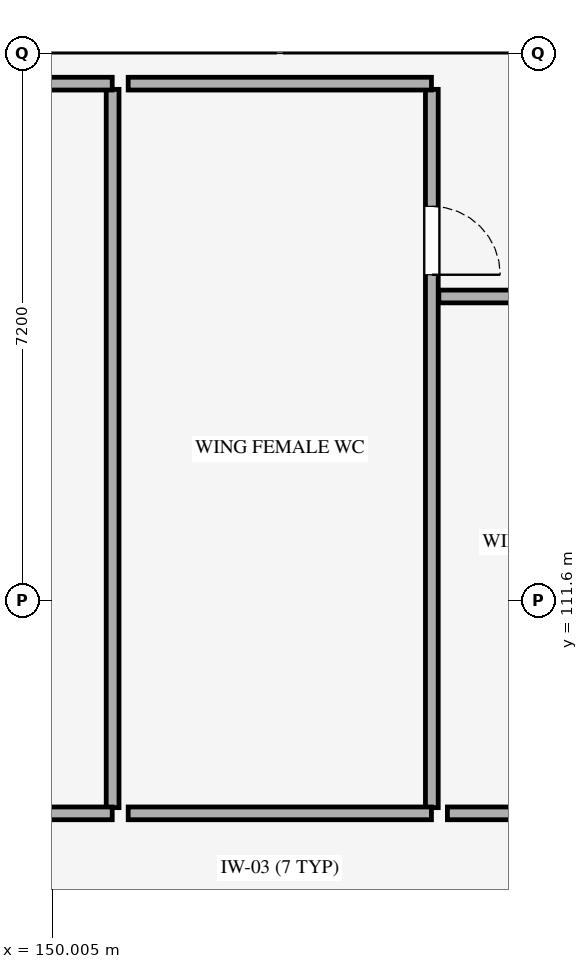
"""IFC4 building model, lengths in metres.
Left out: names, types, materials, properties, quantities, classifications, styles, units other than length and angle.
Written with IfcOpenShell. Run it as: python <this file> out.ifc"""

import sys

from ifc_helpers import new_model, si_unit, direction, frame, frame_2d, origin, place, context, subcontext, project, spatial, rectangle, extrude, element, fill, save


model = new_model("IFC4")
c1 = context("Model", 3, precision=1e-05, world=origin(), true_north=direction((0.0, 1.0)))
c2 = subcontext(c1, "Body", "Model", "MODEL_VIEW")
j1 = project(units=[si_unit("LENGTHUNIT", "METRE"), si_unit("PLANEANGLEUNIT", "RADIAN")], contexts=[c1])
p1 = place(None, origin())
s1 = spatial("IfcSite", under=j1, at=p1, CompositionType="ELEMENT")
p2 = place(p1, origin())
s2 = spatial("IfcBuilding", under=s1, at=p2, CompositionType="ELEMENT")
p3 = place(p2, origin())
s3 = spatial("IfcBuildingStorey", under=s2, at=p3, CompositionType="ELEMENT", Elevation=0.0)
p4 = place(p3, frame((150.8, 118.325, 0.0), z_axis=(0.0, 0.0, 1.0), x_axis=(0.0, -1.0, 0.0)))
e1 = element("IfcWall", 1, at=p4, inside=s3, PredefinedType="STANDARD", context=c2, shape_type="SweptSolid", body=[
    extrude(rectangle(XDim=9.45, YDim=0.168, at=frame_2d((4.725, 0.0))), origin(), (0.0, 0.0, 1.0), 3.27),
])
p5 = place(p3, frame((150.795, 108.8, 0.0), z_axis=(0.0, 0.0, 1.0), x_axis=(-1.0, 0.0, 0.0)))
e2 = element("IfcWall", 2, at=p5, inside=s3, PredefinedType="STANDARD", context=c2, shape_type="SweptSolid", body=[
    extrude(rectangle(XDim=4.19, YDim=0.168, at=frame_2d((2.095, 0.0))), origin(), (0.0, 0.0, 1.0), 4.07),
])
p6 = place(p5, frame((1.645, 0.0, 0.0)))
e3 = element("IfcOpeningElement", 3, at=p6, cuts=e2, PredefinedType="OPENING", context=c2, shape_type="SweptSolid", body=[
    extrude(rectangle(XDim=0.9, YDim=2.1, at=frame_2d((0.45, 1.05))), frame((0.0, 0.094, 0.0), z_axis=(0.0, -1.0, 0.0), x_axis=(1.0, 0.0, 0.0)), (0.0, 0.0, 1.0), 0.188),
])
p7 = place(p3, frame((146.605, 118.4, 0.0), z_axis=(0.0, 0.0, 1.0), x_axis=(1.0, 0.0, 0.0)))
e4 = element("IfcWall", 4, at=p7, inside=s3, PredefinedType="STANDARD", context=c2, shape_type="SweptSolid", body=[
    extrude(rectangle(XDim=4.19, YDim=0.168, at=frame_2d((2.095, 0.0))), origin(), (0.0, 0.0, 1.0), 3.67),
])
p8 = place(p3, frame((155.0, 118.325, 0.0), z_axis=(0.0, 0.0, 1.0), x_axis=(0.0, -1.0, 0.0)))
e5 = element("IfcWall", 5, at=p8, inside=s3, PredefinedType="STANDARD", context=c2, shape_type="SweptSolid", body=[
    extrude(rectangle(XDim=9.45, YDim=0.168, at=frame_2d((4.725, 0.0))), origin(), (0.0, 0.0, 1.0), 3.27),
])
p9 = place(p8, frame((1.539, 0.0, 0.0)))
e6 = element("IfcOpeningElement", 6, at=p9, cuts=e5, PredefinedType="OPENING", context=c2, shape_type="SweptSolid", body=[
    extrude(rectangle(XDim=0.9, YDim=2.1, at=frame_2d((0.45, 1.05))), frame((0.0, 0.094, 0.0), z_axis=(0.0, -1.0, 0.0), x_axis=(1.0, 0.0, 0.0)), (0.0, 0.0, 1.0), 0.188),
])
p10 = place(p3, frame((154.995, 108.8, 0.0), z_axis=(0.0, 0.0, 1.0), x_axis=(-1.0, 0.0, 0.0)))
e7 = element("IfcWall", 7, at=p10, inside=s3, PredefinedType="STANDARD", context=c2, shape_type="SweptSolid", body=[
    extrude(rectangle(XDim=3.99, YDim=0.168, at=frame_2d((1.995, 0.0))), origin(), (0.0, 0.0, 1.0), 4.07),
])
p11 = place(p3, frame((151.005, 118.4, 0.0), z_axis=(0.0, 0.0, 1.0), x_axis=(1.0, 0.0, 0.0)))
e8 = element("IfcWall", 8, at=p11, inside=s3, PredefinedType="STANDARD", context=c2, shape_type="SweptSolid", body=[
    extrude(rectangle(XDim=3.99, YDim=0.168, at=frame_2d((1.995, 0.0))), origin(), (0.0, 0.0, 1.0), 3.67),
])
p12 = place(p3, frame((158.395, 108.8, 0.0), z_axis=(0.0, 0.0, 1.0), x_axis=(-1.0, 0.0, 0.0)))
e9 = element("IfcWall", 9, at=p12, inside=s3, PredefinedType="STANDARD", context=c2, shape_type="SweptSolid", body=[
    extrude(rectangle(XDim=3.19, YDim=0.168, at=frame_2d((1.595, 0.0))), origin(), (0.0, 0.0, 1.0), 4.49),
])
p13 = place(p3, frame((155.092, 115.6, 0.0), z_axis=(0.0, 0.0, 1.0), x_axis=(1.0, 0.0, 0.0)))
e10 = element("IfcWall", 10, at=p13, inside=s3, PredefinedType="STANDARD", context=c2, shape_type="SweptSolid", body=[
    extrude(rectangle(XDim=3.303, YDim=0.168, at=frame_2d((1.651, 0.0))), origin(), (0.0, 0.0, 1.0), 4.49),
])
p14 = place(p9, origin())
e11 = element("IfcDoor", 11, at=p14, inside=s3, OperationType="SINGLE_SWING_RIGHT", PredefinedType="DOOR", context=c2, shape_type="SweptSolid", body=[
    extrude(rectangle(XDim=0.9, YDim=2.1, at=frame_2d((0.45, 1.05))), frame((0.0, 0.025, 0.0), z_axis=(0.0, -1.0, 0.0), x_axis=(1.0, 0.0, 0.0)), (0.0, 0.0, 1.0), 0.05),
])
fill(e6, e11)
save(model, sys.argv[1])
